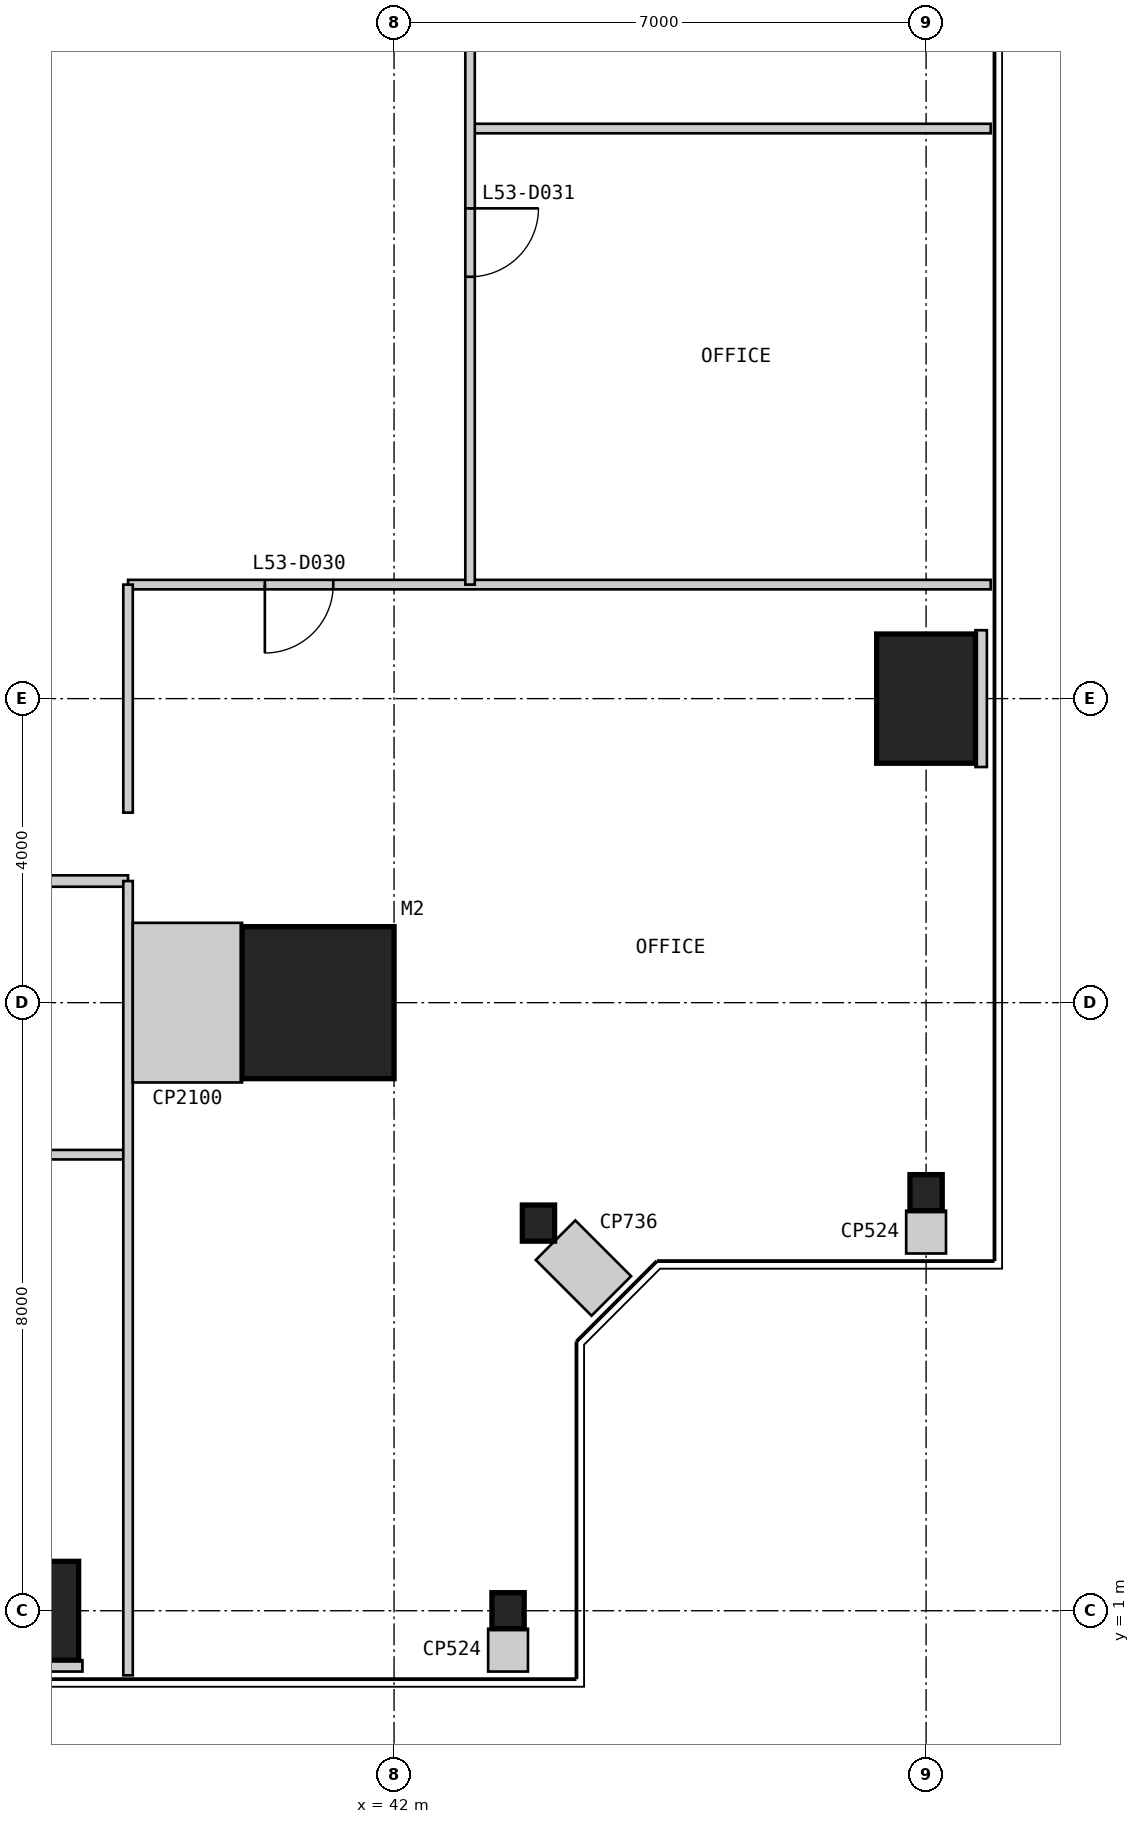
"""IFC4 building model, lengths in metres.
Left out: names, types, materials, properties, quantities, classifications, styles, units other than length and angle.
Written with IfcOpenShell. Run it as: python <this file> out.ifc"""

import sys

from ifc_helpers import new_model, si_unit, direction, frame, frame_2d, origin, origin_2d, place, context, subcontext, project, spatial, rectangle, i_section, extrude, element, fill, save


model = new_model("IFC4")
c1 = context("Model", 3, precision=1e-05, world=origin(), true_north=direction((0.0, 1.0)))
c2 = subcontext(c1, "Body", "Model", "MODEL_VIEW")
j1 = project(units=[si_unit("LENGTHUNIT", "METRE"), si_unit("PLANEANGLEUNIT", "RADIAN")], contexts=[c1])
p1 = place(None, origin())
s1 = spatial("IfcSite", under=j1, at=p1, CompositionType="ELEMENT")
p2 = place(p1, origin())
s2 = spatial("IfcBuilding", under=s1, at=p2, CompositionType="ELEMENT")
p3 = place(p2, frame((0.0, 0.0, 225.8)))
s3 = spatial("IfcBuildingStorey", under=s2, at=p3, CompositionType="ELEMENT", Elevation=225.8)
p4 = place(p3, frame((41.0, 9.0, 0.0), z_axis=(0.0, 0.0, 1.0), x_axis=(1.0, 0.0, 0.0)))
e1 = element("IfcColumn", 1, at=p4, inside=s3, PredefinedType="COLUMN", context=c2, shape_type="SweptSolid", body=[
    extrude(rectangle(XDim=2.0, YDim=2.0, at=origin_2d()), origin(), (0.0, 0.0, 1.0), 4.0),
])
p5 = place(p3, frame((37.0, 1.0, 0.0), z_axis=(0.0, 0.0, 1.0), x_axis=(1.0, 0.0, 0.0)))
e2 = element("IfcColumn", 2, at=p5, inside=s3, PredefinedType="COLUMN", context=c2, shape_type="SweptSolid", body=[
    extrude(rectangle(XDim=1.7, YDim=1.3, at=origin_2d()), origin(), (0.0, 0.0, 1.0), 4.0),
])
for number, where, z_axis, x_axis in (
    (3, (43.5, 1.0, 0.0), (0.0, 0.0, 1.0), (1.0, 0.0, 0.0)),
    (4, (43.9, 6.1, 0.0), (0.0, 0.0, 1.0), (1.0, 0.0, 0.0)),
    (5, (49.0, 6.5, 0.0), (0.0, 0.0, 1.0), (1.0, 0.0, 0.0)),
):
    element("IfcColumn", number, at=place(p3, frame(where, z_axis=z_axis, x_axis=x_axis)), inside=s3, PredefinedType="COLUMN", context=c2, shape_type="SweptSolid", body=[
        extrude(i_section(OverallWidth=0.424, OverallDepth=0.475, WebThickness=0.048, FlangeThickness=0.077, at=origin_2d()), origin(), (0.0, 0.0, 1.0), 4.0),
    ])
p6 = place(p3, frame((49.0, 13.0, 0.0), z_axis=(0.0, 0.0, 1.0), x_axis=(1.0, 0.0, 0.0)))
e6 = element("IfcColumn", 6, at=p6, inside=s3, PredefinedType="COLUMN", context=c2, shape_type="SweptSolid", body=[
    extrude(rectangle(XDim=1.3, YDim=1.7, at=origin_2d()), origin(), (0.0, 0.0, 1.0), 4.0),
])
p7 = place(p3, frame((11.5, 10.6, 0.0), z_axis=(0.0, 0.0, 1.0), x_axis=(1.0, 0.0, 0.0)))
e7 = element("IfcWall", 7, at=p7, inside=s3, PredefinedType="PARTITIONING", context=c2, shape_type="SweptSolid", body=[
    extrude(rectangle(XDim=27.0, YDim=0.15, at=frame_2d((13.5, 0.0))), origin(), (0.0, 0.0, 1.0), 3.85),
])
p8 = place(p7, frame((3.25, 0.0, 0.0)))
e8 = element("IfcOpeningElement", 8, at=p8, cuts=e7, PredefinedType="OPENING", context=c2, shape_type="SweptSolid", body=[
    extrude(rectangle(XDim=1.0, YDim=2.2, at=frame_2d((0.5, 1.1))), frame((0.0, 0.085, 0.0), z_axis=(0.0, -1.0, 0.0), x_axis=(1.0, 0.0, 0.0)), (0.0, 0.0, 1.0), 0.17),
])
p9 = place(p7, frame((22.75, 0.0, 0.0)))
e9 = element("IfcOpeningElement", 9, at=p9, cuts=e7, PredefinedType="OPENING", context=c2, shape_type="SweptSolid", body=[
    extrude(rectangle(XDim=1.0, YDim=2.2, at=frame_2d((0.5, 1.1))), frame((0.0, 0.085, 0.0), z_axis=(0.0, -1.0, 0.0), x_axis=(1.0, 0.0, 0.0)), (0.0, 0.0, 1.0), 0.17),
])
p10 = place(p3, frame((14.5, 7.0, 0.0), z_axis=(0.0, 0.0, 1.0), x_axis=(1.0, 0.0, 0.0)))
e10 = element("IfcWall", 10, at=p10, inside=s3, PredefinedType="PARTITIONING", context=c2, shape_type="SweptSolid", body=[
    extrude(rectangle(XDim=24.0, YDim=0.125, at=frame_2d((12.0, 0.0))), origin(), (0.0, 0.0, 1.0), 3.85),
])
p11 = place(p10, frame((4.05, 0.0, 0.0)))
e11 = element("IfcOpeningElement", 11, at=p11, cuts=e10, PredefinedType="OPENING", context=c2, shape_type="SweptSolid", body=[
    extrude(rectangle(XDim=0.9, YDim=2.2, at=frame_2d((0.45, 1.1))), frame((0.0, 0.073, 0.0), z_axis=(0.0, -1.0, 0.0), x_axis=(1.0, 0.0, 0.0)), (0.0, 0.0, 1.0), 0.145),
])
p12 = place(p10, frame((10.05, 0.0, 0.0)))
e12 = element("IfcOpeningElement", 12, at=p12, cuts=e10, PredefinedType="OPENING", context=c2, shape_type="SweptSolid", body=[
    extrude(rectangle(XDim=0.9, YDim=2.2, at=frame_2d((0.45, 1.1))), frame((0.0, 0.073, 0.0), z_axis=(0.0, -1.0, 0.0), x_axis=(1.0, 0.0, 0.0)), (0.0, 0.0, 1.0), 0.145),
])
p13 = place(p10, frame((16.05, 0.0, 0.0)))
e13 = element("IfcOpeningElement", 13, at=p13, cuts=e10, PredefinedType="OPENING", context=c2, shape_type="SweptSolid", body=[
    extrude(rectangle(XDim=0.9, YDim=2.2, at=frame_2d((0.45, 1.1))), frame((0.0, 0.073, 0.0), z_axis=(0.0, -1.0, 0.0), x_axis=(1.0, 0.0, 0.0)), (0.0, 0.0, 1.0), 0.145),
])
p14 = place(p10, frame((19.0, 0.0, 0.0)))
e14 = element("IfcOpeningElement", 14, at=p14, cuts=e10, PredefinedType="OPENING", context=c2, shape_type="SweptSolid", body=[
    extrude(rectangle(XDim=1.0, YDim=2.2, at=frame_2d((0.5, 1.1))), frame((0.0, 0.073, 0.0), z_axis=(0.0, -1.0, 0.0), x_axis=(1.0, 0.0, 0.0)), (0.0, 0.0, 1.0), 0.145),
])
p15 = place(p3, frame((38.5, 0.15, 0.0), z_axis=(0.0, 0.0, 1.0), x_axis=(0.0, 1.0, 0.0)))
e15 = element("IfcWall", 15, at=p15, inside=s3, PredefinedType="PARTITIONING", context=c2, shape_type="SweptSolid", body=[
    extrude(rectangle(XDim=10.45, YDim=0.125, at=frame_2d((5.225, 0.0))), origin(), (0.0, 0.0, 1.0), 3.85),
])
p16 = place(p3, frame((49.85, 14.5, 0.0), z_axis=(0.0, 0.0, 1.0), x_axis=(-1.0, 0.0, 0.0)))
e16 = element("IfcWall", 16, at=p16, inside=s3, PredefinedType="PARTITIONING", context=c2, shape_type="SweptSolid", body=[
    extrude(rectangle(XDim=11.35, YDim=0.125, at=frame_2d((5.675, 0.0))), origin(), (0.0, 0.0, 1.0), 3.85),
])
p17 = place(p16, frame((8.65, 0.0, 0.0)))
e17 = element("IfcOpeningElement", 17, at=p17, cuts=e16, PredefinedType="OPENING", context=c2, shape_type="SweptSolid", body=[
    extrude(rectangle(XDim=0.9, YDim=2.2, at=frame_2d((0.45, 1.1))), frame((0.0, 0.073, 0.0), z_axis=(0.0, -1.0, 0.0), x_axis=(1.0, 0.0, 0.0)), (0.0, 0.0, 1.0), 0.145),
])
p18 = place(p3, frame((49.85, 20.5, 0.0), z_axis=(0.0, 0.0, 1.0), x_axis=(-1.0, 0.0, 0.0)))
e18 = element("IfcWall", 18, at=p18, inside=s3, PredefinedType="PARTITIONING", context=c2, shape_type="SweptSolid", body=[
    extrude(rectangle(XDim=6.85, YDim=0.125, at=frame_2d((3.425, 0.0))), origin(), (0.0, 0.0, 1.0), 3.85),
])
p19 = place(p3, frame((43.0, 14.5, 0.0), z_axis=(0.0, 0.0, 1.0), x_axis=(0.0, 1.0, 0.0)))
e19 = element("IfcWall", 19, at=p19, inside=s3, PredefinedType="PARTITIONING", context=c2, shape_type="SweptSolid", body=[
    extrude(rectangle(XDim=24.0, YDim=0.125, at=frame_2d((12.0, 0.0))), origin(), (0.0, 0.0, 1.0), 3.238),
])
p20 = place(p19, frame((4.05, 0.0, 0.0)))
e20 = element("IfcOpeningElement", 20, at=p20, cuts=e19, PredefinedType="OPENING", context=c2, shape_type="SweptSolid", body=[
    extrude(rectangle(XDim=0.9, YDim=2.2, at=frame_2d((0.45, 1.1))), frame((0.0, 0.073, 0.0), z_axis=(0.0, -1.0, 0.0), x_axis=(1.0, 0.0, 0.0)), (0.0, 0.0, 1.0), 0.145),
])
p21 = place(p19, frame((10.05, 0.0, 0.0)))
e21 = element("IfcOpeningElement", 21, at=p21, cuts=e19, PredefinedType="OPENING", context=c2, shape_type="SweptSolid", body=[
    extrude(rectangle(XDim=0.9, YDim=2.2, at=frame_2d((0.45, 1.1))), frame((0.0, 0.073, 0.0), z_axis=(0.0, -1.0, 0.0), x_axis=(1.0, 0.0, 0.0)), (0.0, 0.0, 1.0), 0.145),
])
p22 = place(p19, frame((16.05, 0.0, 0.0)))
e22 = element("IfcOpeningElement", 22, at=p22, cuts=e19, PredefinedType="OPENING", context=c2, shape_type="SweptSolid", body=[
    extrude(rectangle(XDim=0.9, YDim=2.2, at=frame_2d((0.45, 1.1))), frame((0.0, 0.073, 0.0), z_axis=(0.0, -1.0, 0.0), x_axis=(1.0, 0.0, 0.0)), (0.0, 0.0, 1.0), 0.145),
])
p23 = place(p19, frame((19.05, 0.0, 0.0)))
e23 = element("IfcOpeningElement", 23, at=p23, cuts=e19, PredefinedType="OPENING", context=c2, shape_type="SweptSolid", body=[
    extrude(rectangle(XDim=0.9, YDim=2.2, at=frame_2d((0.45, 1.1))), frame((0.0, 0.073, 0.0), z_axis=(0.0, -1.0, 0.0), x_axis=(1.0, 0.0, 0.0)), (0.0, 0.0, 1.0), 0.145),
])
p24 = place(p3, frame((38.5, 11.5, 0.0), z_axis=(0.0, 0.0, 1.0), x_axis=(0.0, 1.0, 0.0)))
e24 = element("IfcWall", 24, at=p24, inside=s3, PredefinedType="PARTITIONING", context=c2, shape_type="SweptSolid", body=[
    extrude(rectangle(XDim=3.0, YDim=0.125, at=frame_2d((1.5, 0.0))), origin(), (0.0, 0.0, 1.0), 3.85),
])
p25 = place(p3, frame((37.0, 0.2, 0.0), z_axis=(0.0, 0.0, 1.0), x_axis=(0.0, 1.0, 0.0)))
e25 = element("IfcWall", 25, at=p25, inside=s3, PredefinedType="PARTITIONING", context=c2, shape_type="SweptSolid", body=[
    extrude(rectangle(XDim=0.15, YDim=1.8, at=frame_2d((0.075, 0.0))), origin(), (0.0, 0.0, 1.0), 3.85),
])
p26 = place(p3, frame((38.562, 9.0, 0.0), z_axis=(0.0, 0.0, 1.0), x_axis=(1.0, 0.0, 0.0)))
e26 = element("IfcWall", 26, at=p26, inside=s3, PredefinedType="PARTITIONING", context=c2, shape_type="SweptSolid", body=[
    extrude(rectangle(XDim=1.438, YDim=2.1, at=frame_2d((0.719, 0.0))), origin(), (0.0, 0.0, 1.0), 3.85),
])
p27 = place(p3, frame((43.5, 0.2, 0.0), z_axis=(0.0, 0.0, 1.0), x_axis=(0.0, 1.0, 0.0)))
e27 = element("IfcWall", 27, at=p27, inside=s3, PredefinedType="PARTITIONING", context=c2, shape_type="SweptSolid", body=[
    extrude(rectangle(XDim=0.562, YDim=0.524, at=frame_2d((0.281, 0.0))), origin(), (0.0, 0.0, 1.0), 3.85),
])
p28 = place(p3, frame((44.859, 5.141, 0.0), z_axis=(0.0, 0.0, 1.0), x_axis=(-0.707106781187, 0.707106781187, 0.0)))
e28 = element("IfcWall", 28, at=p28, inside=s3, PredefinedType="PARTITIONING", context=c2, shape_type="SweptSolid", body=[
    extrude(rectangle(XDim=1.038, YDim=0.736, at=frame_2d((0.519, 0.0))), origin(), (0.0, 0.0, 1.0), 3.85),
])
p29 = place(p3, frame((49.0, 5.7, 0.0), z_axis=(0.0, 0.0, 1.0), x_axis=(0.0, 1.0, 0.0)))
e29 = element("IfcWall", 29, at=p29, inside=s3, PredefinedType="PARTITIONING", context=c2, shape_type="SweptSolid", body=[
    extrude(rectangle(XDim=0.562, YDim=0.524, at=frame_2d((0.281, 0.0))), origin(), (0.0, 0.0, 1.0), 3.85),
])
p30 = place(p3, frame((49.8, 13.0, 0.0), z_axis=(0.0, 0.0, 1.0), x_axis=(-1.0, 0.0, 0.0)))
e30 = element("IfcWall", 30, at=p30, inside=s3, PredefinedType="PARTITIONING", context=c2, shape_type="SweptSolid", body=[
    extrude(rectangle(XDim=0.15, YDim=1.8, at=frame_2d((0.075, 0.0))), origin(), (0.0, 0.0, 1.0), 3.85),
])
p31 = place(p17, origin())
e31 = element("IfcDoor", 31, at=p31, inside=s3, OperationType="SINGLE_SWING_RIGHT", PredefinedType="DOOR", context=c2, shape_type="SweptSolid", body=[
    extrude(rectangle(XDim=0.9, YDim=2.2, at=frame_2d((0.45, 1.1))), frame((0.0, 0.025, 0.0), z_axis=(0.0, -1.0, 0.0), x_axis=(1.0, 0.0, 0.0)), (0.0, 0.0, 1.0), 0.05),
])
fill(e17, e31)
p32 = place(p20, frame((0.9, 0.0, 0.0), z_axis=(0.0, 0.0, 1.0), x_axis=(-1.0, 0.0, 0.0)))
e32 = element("IfcDoor", 32, at=p32, inside=s3, OperationType="SINGLE_SWING_LEFT", PredefinedType="DOOR", context=c2, shape_type="SweptSolid", body=[
    extrude(rectangle(XDim=0.9, YDim=2.2, at=frame_2d((0.45, 1.1))), frame((0.0, 0.025, 0.0), z_axis=(0.0, -1.0, 0.0), x_axis=(1.0, 0.0, 0.0)), (0.0, 0.0, 1.0), 0.05),
])
fill(e20, e32)
save(model, sys.argv[1])
